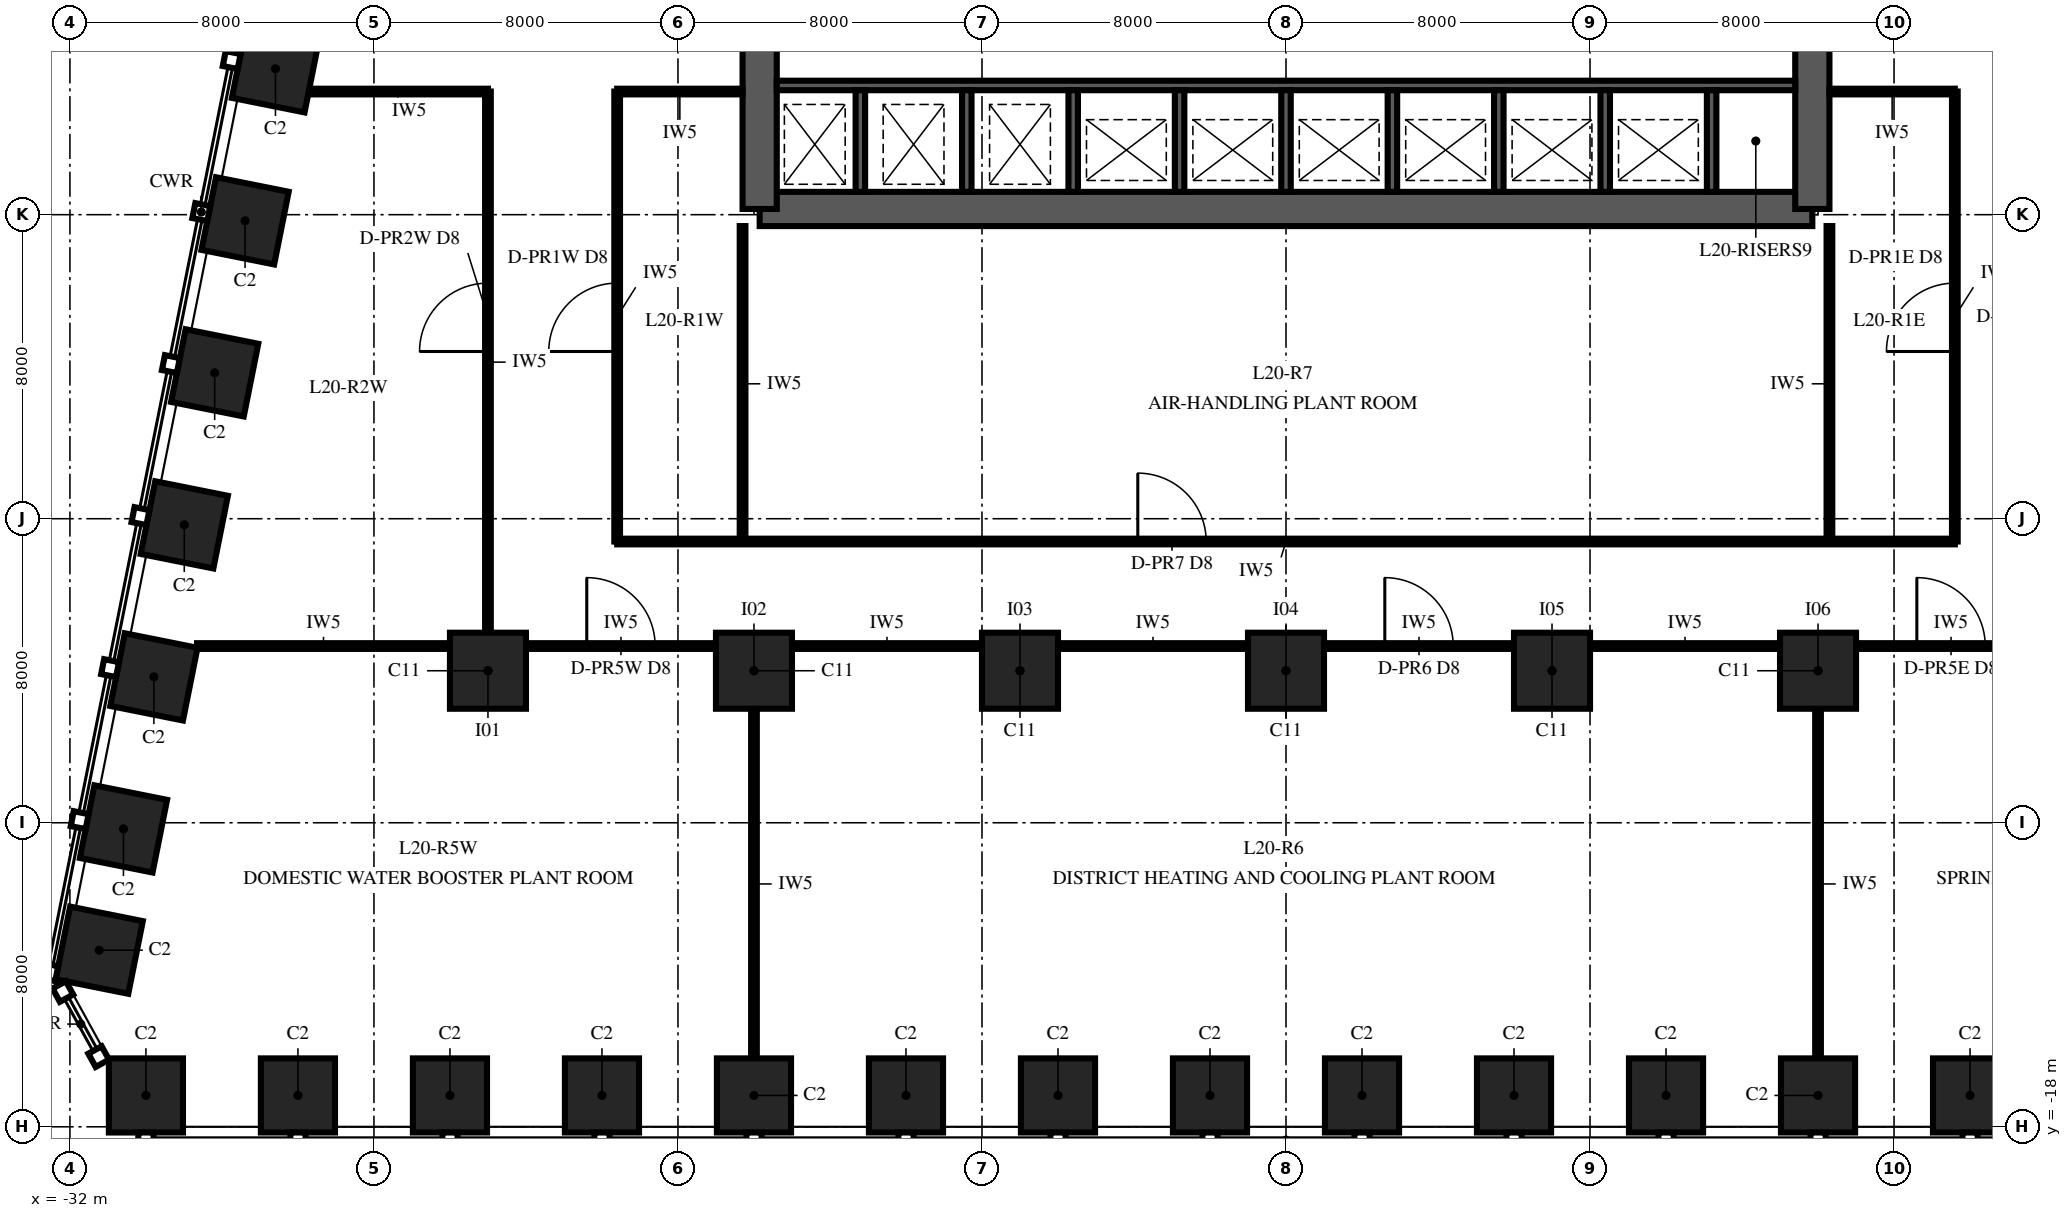
"""IFC4 building model, lengths in metres.
Left out: names, types, materials, properties, quantities, classifications, styles, units other than length and angle.
Written with IfcOpenShell. Run it as: python <this file> out.ifc"""

import sys

from ifc_helpers import new_model, si_unit, direction, frame, frame_2d, origin, origin_2d, place, context, subcontext, project, spatial, polyline, rectangle, outline, extrude, element, fill, save


model = new_model("IFC4")
c1 = context("Model", 3, precision=1e-05, world=origin(), true_north=direction((0.0, 1.0)))
c2 = subcontext(c1, "Body", "Model", "MODEL_VIEW")
j1 = project(units=[si_unit("LENGTHUNIT", "METRE"), si_unit("PLANEANGLEUNIT", "RADIAN")], contexts=[c1])
p1 = place(None, origin())
s1 = spatial("IfcSite", under=j1, at=p1, CompositionType="ELEMENT")
p2 = place(p1, origin())
s2 = spatial("IfcBuilding", under=s1, at=p2, CompositionType="ELEMENT")
p3 = place(p2, frame((0.0, 0.0, 92.0)))
s3 = spatial("IfcBuildingStorey", under=s2, at=p3, CompositionType="ELEMENT", Elevation=92.0)
for number, where, z_axis, x_axis in (
    (1, (-30.0, -17.175, 0.0), (0.0, 0.0, 1.0), (1.0, 0.0, 0.0)),
    (2, (-26.0, -17.175, 0.0), (0.0, 0.0, 1.0), (1.0, 0.0, 0.0)),
    (3, (-22.0, -17.175, 0.0), (0.0, 0.0, 1.0), (1.0, 0.0, 0.0)),
    (4, (-18.0, -17.175, 0.0), (0.0, 0.0, 1.0), (1.0, 0.0, 0.0)),
    (5, (-14.0, -17.175, 0.0), (0.0, 0.0, 1.0), (1.0, 0.0, 0.0)),
    (6, (-10.0, -17.175, 0.0), (0.0, 0.0, 1.0), (1.0, 0.0, 0.0)),
    (7, (-6.0, -17.175, 0.0), (0.0, 0.0, 1.0), (1.0, 0.0, 0.0)),
    (8, (-2.0, -17.175, 0.0), (0.0, 0.0, 1.0), (1.0, 0.0, 0.0)),
    (9, (2.0, -17.175, 0.0), (0.0, 0.0, 1.0), (1.0, 0.0, 0.0)),
    (10, (6.0, -17.175, 0.0), (0.0, 0.0, 1.0), (1.0, 0.0, 0.0)),
    (11, (10.0, -17.175, 0.0), (0.0, 0.0, 1.0), (1.0, 0.0, 0.0)),
    (12, (14.0, -17.175, 0.0), (0.0, 0.0, 1.0), (1.0, 0.0, 0.0)),
    (13, (18.0, -17.175, 0.0), (0.0, 0.0, 1.0), (1.0, 0.0, 0.0)),
    (14, (-26.591, 9.838, 0.0), (0.0, 0.0, 1.0), (-0.196, -0.981, 0.0)),
    (15, (-27.391, 5.838, 0.0), (0.0, 0.0, 1.0), (-0.196, -0.981, 0.0)),
    (16, (-28.191, 1.838, 0.0), (0.0, 0.0, 1.0), (-0.196, -0.981, 0.0)),
    (17, (-28.991, -2.162, 0.0), (0.0, 0.0, 1.0), (-0.196, -0.981, 0.0)),
    (18, (-29.791, -6.162, 0.0), (0.0, 0.0, 1.0), (-0.196, -0.981, 0.0)),
    (19, (-30.591, -10.162, 0.0), (0.0, 0.0, 1.0), (-0.196, -0.981, 0.0)),
    (20, (-31.229, -13.353, 0.0), (0.0, 0.0, 1.0), (-0.196, -0.981, 0.0)),
):
    element("IfcColumn", number, at=place(p3, frame(where, z_axis=z_axis, x_axis=x_axis)), inside=s3, PredefinedType="COLUMN", context=c2, shape_type="SweptSolid", body=[
        extrude(rectangle(XDim=1.95, YDim=1.95, at=origin_2d()), origin(), (0.0, 0.0, 1.0), 6.0),
    ])
for number, where, z_axis, x_axis in (
    (21, (-21.0, -6.0, 0.0), (0.0, 0.0, 1.0), (1.0, 0.0, 0.0)),
    (22, (-14.0, -6.0, 0.0), (0.0, 0.0, 1.0), (1.0, 0.0, 0.0)),
    (23, (-7.0, -6.0, 0.0), (0.0, 0.0, 1.0), (1.0, 0.0, 0.0)),
    (24, (0.0, -6.0, 0.0), (0.0, 0.0, 1.0), (1.0, 0.0, 0.0)),
    (25, (7.0, -6.0, 0.0), (0.0, 0.0, 1.0), (1.0, 0.0, 0.0)),
    (26, (14.0, -6.0, 0.0), (0.0, 0.0, 1.0), (1.0, 0.0, 0.0)),
):
    element("IfcColumn", number, at=place(p3, frame(where, z_axis=z_axis, x_axis=x_axis)), inside=s3, PredefinedType="COLUMN", context=c2, shape_type="SweptSolid", body=[
        extrude(rectangle(XDim=2.0, YDim=2.0, at=origin_2d()), origin(), (0.0, 0.0, 1.0), 6.0),
    ])
p4 = place(p3, frame((-13.85, 6.15, 0.0), z_axis=(0.0, 0.0, 1.0), x_axis=(1.0, 0.0, 0.0)))
e27 = element("IfcWall", 27, at=p4, inside=s3, PredefinedType="SHEAR", context=c2, shape_type="SweptSolid", body=[
    extrude(rectangle(XDim=27.7, YDim=0.9, at=frame_2d((13.85, 0.0))), origin(), (0.0, 0.0, 1.0), 6.0),
])
for number, where, z_axis, x_axis in (
    (28, (13.85, 6.15, 0.0), (0.0, 0.0, 1.0), (0.0, 1.0, 0.0)),
    (29, (-13.85, 23.85, 0.0), (0.0, 0.0, 1.0), (0.0, -1.0, 0.0)),
):
    element("IfcWall", number, at=place(p3, frame(where, z_axis=z_axis, x_axis=x_axis)), inside=s3, PredefinedType="SHEAR", context=c2, shape_type="SweptSolid", body=[
        extrude(outline(polyline([(0.0, -0.45), (17.7, -0.45), (17.7, 0.0), (17.25, 0.0), (17.25, 0.45), (0.45, 0.45), (0.45, 0.0), (0.0, 0.0), (0.0, -0.45)])), origin(), (0.0, 0.0, 1.0), 6.0),
    ])
p5 = place(p3, frame((-13.4, 9.4, 0.0), z_axis=(0.0, 0.0, 1.0), x_axis=(1.0, 0.0, 0.0)))
e30 = element("IfcWall", 30, at=p5, inside=s3, PredefinedType="SHEAR", context=c2, shape_type="SweptSolid", body=[
    extrude(rectangle(XDim=26.8, YDim=0.25, at=frame_2d((13.4, 0.0))), origin(), (0.0, 0.0, 1.0), 6.0),
])
for number, where, z_axis, x_axis in (
    (31, (-11.2, 6.6, 0.0), (0.0, 0.0, 1.0), (0.0, 1.0, 0.0)),
    (32, (-8.4, 6.6, 0.0), (0.0, 0.0, 1.0), (0.0, 1.0, 0.0)),
    (33, (-5.6, 6.6, 0.0), (0.0, 0.0, 1.0), (0.0, 1.0, 0.0)),
    (34, (-2.8, 6.6, 0.0), (0.0, 0.0, 1.0), (0.0, 1.0, 0.0)),
    (35, (0.0, 6.6, 0.0), (0.0, 0.0, 1.0), (0.0, 1.0, 0.0)),
    (36, (2.8, 6.6, 0.0), (0.0, 0.0, 1.0), (0.0, 1.0, 0.0)),
    (37, (5.6, 6.6, 0.0), (0.0, 0.0, 1.0), (0.0, 1.0, 0.0)),
    (38, (8.4, 6.6, 0.0), (0.0, 0.0, 1.0), (0.0, 1.0, 0.0)),
    (39, (11.2, 6.6, 0.0), (0.0, 0.0, 1.0), (0.0, 1.0, 0.0)),
):
    element("IfcWall", number, at=place(p3, frame(where, z_axis=z_axis, x_axis=x_axis)), inside=s3, PredefinedType="SHEAR", context=c2, shape_type="SweptSolid", body=[
        extrude(rectangle(XDim=2.675, YDim=0.25, at=frame_2d((1.337, 0.0))), origin(), (0.0, 0.0, 1.0), 6.0),
    ])
p6 = place(p3, frame((17.6, -2.6, 0.0), z_axis=(0.0, 0.0, 1.0), x_axis=(0.0, 1.0, 0.0)))
e40 = element("IfcWall", 40, at=p6, inside=s3, PredefinedType="PARTITIONING", context=c2, shape_type="SweptSolid", body=[
    extrude(rectangle(XDim=11.84, YDim=0.15, at=frame_2d((5.92, 0.0))), origin(), (0.0, 0.0, 1.0), 5.8),
])
p7 = place(p6, frame((5.0, 0.0, 0.0)))
e41 = element("IfcOpeningElement", 41, at=p7, cuts=e40, PredefinedType="OPENING", context=c2, shape_type="SweptSolid", body=[
    extrude(rectangle(XDim=1.8, YDim=2.4, at=frame_2d((0.9, 1.2))), frame((0.0, 0.09, 0.0), z_axis=(0.0, -1.0, 0.0), x_axis=(1.0, 0.0, 0.0)), (0.0, 0.0, 1.0), 0.18),
])
p8 = place(p3, frame((14.3, -2.6, 0.0), z_axis=(0.0, 0.0, 1.0), x_axis=(0.0, 1.0, 0.0)))
e42 = element("IfcWall", 42, at=p8, inside=s3, PredefinedType="PARTITIONING", context=c2, shape_type="SweptSolid", body=[
    extrude(rectangle(XDim=8.3, YDim=0.15, at=frame_2d((4.15, 0.0))), origin(), (0.0, 0.0, 1.0), 5.8),
])
p9 = place(p3, frame((14.3, 9.24, 0.0), z_axis=(0.0, 0.0, 1.0), x_axis=(1.0, 0.0, 0.0)))
e43 = element("IfcWall", 43, at=p9, inside=s3, PredefinedType="PARTITIONING", context=c2, shape_type="SweptSolid", body=[
    extrude(rectangle(XDim=3.3, YDim=0.15, at=frame_2d((1.65, 0.0))), origin(), (0.0, 0.0, 1.0), 5.179),
])
p10 = place(p3, frame((14.0, -7.0, 0.0), z_axis=(0.0, 0.0, 1.0), x_axis=(0.0, -1.0, 0.0)))
e44 = element("IfcWall", 44, at=p10, inside=s3, PredefinedType="PARTITIONING", context=c2, shape_type="SweptSolid", body=[
    extrude(rectangle(XDim=9.22, YDim=0.15, at=frame_2d((4.61, 0.0))), origin(), (0.0, 0.0, 1.0), 5.179),
])
p11 = place(p3, frame((-17.6, -2.6, 0.0), z_axis=(0.0, 0.0, 1.0), x_axis=(0.0, 1.0, 0.0)))
e45 = element("IfcWall", 45, at=p11, inside=s3, PredefinedType="PARTITIONING", context=c2, shape_type="SweptSolid", body=[
    extrude(rectangle(XDim=11.84, YDim=0.15, at=frame_2d((5.92, 0.0))), origin(), (0.0, 0.0, 1.0), 5.8),
])
p12 = place(p11, frame((5.0, 0.0, 0.0)))
e46 = element("IfcOpeningElement", 46, at=p12, cuts=e45, PredefinedType="OPENING", context=c2, shape_type="SweptSolid", body=[
    extrude(rectangle(XDim=1.8, YDim=2.4, at=frame_2d((0.9, 1.2))), frame((0.0, 0.09, 0.0), z_axis=(0.0, -1.0, 0.0), x_axis=(1.0, 0.0, 0.0)), (0.0, 0.0, 1.0), 0.18),
])
p13 = place(p3, frame((-21.0, -5.0, 0.0), z_axis=(0.0, 0.0, 1.0), x_axis=(0.0, 1.0, 0.0)))
e47 = element("IfcWall", 47, at=p13, inside=s3, PredefinedType="PARTITIONING", context=c2, shape_type="SweptSolid", body=[
    extrude(rectangle(XDim=14.24, YDim=0.15, at=frame_2d((7.12, 0.0))), origin(), (0.0, 0.0, 1.0), 5.8),
])
p14 = place(p13, frame((7.4, 0.0, 0.0)))
e48 = element("IfcOpeningElement", 48, at=p14, cuts=e47, PredefinedType="OPENING", context=c2, shape_type="SweptSolid", body=[
    extrude(rectangle(XDim=1.8, YDim=2.4, at=frame_2d((0.9, 1.2))), frame((0.0, 0.09, 0.0), z_axis=(0.0, -1.0, 0.0), x_axis=(1.0, 0.0, 0.0)), (0.0, 0.0, 1.0), 0.18),
])
p15 = place(p3, frame((-14.3, -2.6, 0.0), z_axis=(0.0, 0.0, 1.0), x_axis=(0.0, 1.0, 0.0)))
e49 = element("IfcWall", 49, at=p15, inside=s3, PredefinedType="PARTITIONING", context=c2, shape_type="SweptSolid", body=[
    extrude(rectangle(XDim=8.3, YDim=0.15, at=frame_2d((4.15, 0.0))), origin(), (0.0, 0.0, 1.0), 5.8),
])
p16 = place(p3, frame((-14.3, 9.24, 0.0), z_axis=(0.0, 0.0, 1.0), x_axis=(-1.0, 0.0, 0.0)))
e50 = element("IfcWall", 50, at=p16, inside=s3, PredefinedType="PARTITIONING", context=c2, shape_type="SweptSolid", body=[
    extrude(rectangle(XDim=3.3, YDim=0.15, at=frame_2d((1.65, 0.0))), origin(), (0.0, 0.0, 1.0), 5.179),
])
p17 = place(p3, frame((-21.0, 9.24, 0.0), z_axis=(0.0, 0.0, 1.0), x_axis=(-1.0, 0.0, 0.0)))
e51 = element("IfcWall", 51, at=p17, inside=s3, PredefinedType="PARTITIONING", context=c2, shape_type="SweptSolid", body=[
    extrude(rectangle(XDim=4.737, YDim=0.15, at=frame_2d((2.368, 0.0))), origin(), (0.0, 0.0, 1.0), 5.8),
])
p18 = place(p3, frame((-14.0, -7.0, 0.0), z_axis=(0.0, 0.0, 1.0), x_axis=(0.0, -1.0, 0.0)))
e52 = element("IfcWall", 52, at=p18, inside=s3, PredefinedType="PARTITIONING", context=c2, shape_type="SweptSolid", body=[
    extrude(rectangle(XDim=9.22, YDim=0.15, at=frame_2d((4.61, 0.0))), origin(), (0.0, 0.0, 1.0), 5.179),
])
p19 = place(p3, frame((-28.655, -5.35, 0.0), z_axis=(0.0, 0.0, 1.0), x_axis=(1.0, 0.0, 0.0)))
e53 = element("IfcWall", 53, at=p19, inside=s3, PredefinedType="PARTITIONING", context=c2, shape_type="SweptSolid", body=[
    extrude(rectangle(XDim=6.655, YDim=0.15, at=frame_2d((3.327, 0.0))), origin(), (0.0, 0.0, 1.0), 5.8),
])
p20 = place(p3, frame((-20.0, -5.35, 0.0), z_axis=(0.0, 0.0, 1.0), x_axis=(1.0, 0.0, 0.0)))
e54 = element("IfcWall", 54, at=p20, inside=s3, PredefinedType="PARTITIONING", context=c2, shape_type="SweptSolid", body=[
    extrude(rectangle(XDim=5.0, YDim=0.15, at=frame_2d((2.5, 0.0))), origin(), (0.0, 0.0, 1.0), 5.8),
])
p21 = place(p20, frame((1.6, 0.0, 0.0)))
e55 = element("IfcOpeningElement", 55, at=p21, cuts=e54, PredefinedType="OPENING", context=c2, shape_type="SweptSolid", body=[
    extrude(rectangle(XDim=1.8, YDim=2.4, at=frame_2d((0.9, 1.2))), frame((0.0, 0.09, 0.0), z_axis=(0.0, -1.0, 0.0), x_axis=(1.0, 0.0, 0.0)), (0.0, 0.0, 1.0), 0.18),
])
for number, where, z_axis, x_axis in (
    (56, (-13.0, -5.35, 0.0), (0.0, 0.0, 1.0), (1.0, 0.0, 0.0)),
    (57, (-6.0, -5.35, 0.0), (0.0, 0.0, 1.0), (1.0, 0.0, 0.0)),
):
    element("IfcWall", number, at=place(p3, frame(where, z_axis=z_axis, x_axis=x_axis)), inside=s3, PredefinedType="PARTITIONING", context=c2, shape_type="SweptSolid", body=[
        extrude(rectangle(XDim=5.0, YDim=0.15, at=frame_2d((2.5, 0.0))), origin(), (0.0, 0.0, 1.0), 5.8),
    ])
p22 = place(p3, frame((1.0, -5.35, 0.0), z_axis=(0.0, 0.0, 1.0), x_axis=(1.0, 0.0, 0.0)))
e58 = element("IfcWall", 58, at=p22, inside=s3, PredefinedType="PARTITIONING", context=c2, shape_type="SweptSolid", body=[
    extrude(rectangle(XDim=5.0, YDim=0.15, at=frame_2d((2.5, 0.0))), origin(), (0.0, 0.0, 1.0), 5.8),
])
p23 = place(p22, frame((1.6, 0.0, 0.0)))
e59 = element("IfcOpeningElement", 59, at=p23, cuts=e58, PredefinedType="OPENING", context=c2, shape_type="SweptSolid", body=[
    extrude(rectangle(XDim=1.8, YDim=2.4, at=frame_2d((0.9, 1.2))), frame((0.0, 0.09, 0.0), z_axis=(0.0, -1.0, 0.0), x_axis=(1.0, 0.0, 0.0)), (0.0, 0.0, 1.0), 0.18),
])
p24 = place(p3, frame((8.0, -5.35, 0.0), z_axis=(0.0, 0.0, 1.0), x_axis=(1.0, 0.0, 0.0)))
e60 = element("IfcWall", 60, at=p24, inside=s3, PredefinedType="PARTITIONING", context=c2, shape_type="SweptSolid", body=[
    extrude(rectangle(XDim=5.0, YDim=0.15, at=frame_2d((2.5, 0.0))), origin(), (0.0, 0.0, 1.0), 5.8),
])
p25 = place(p3, frame((15.0, -5.35, 0.0), z_axis=(0.0, 0.0, 1.0), x_axis=(1.0, 0.0, 0.0)))
e61 = element("IfcWall", 61, at=p25, inside=s3, PredefinedType="PARTITIONING", context=c2, shape_type="SweptSolid", body=[
    extrude(rectangle(XDim=5.0, YDim=0.15, at=frame_2d((2.5, 0.0))), origin(), (0.0, 0.0, 1.0), 5.8),
])
p26 = place(p25, frame((1.6, 0.0, 0.0)))
e62 = element("IfcOpeningElement", 62, at=p26, cuts=e61, PredefinedType="OPENING", context=c2, shape_type="SweptSolid", body=[
    extrude(rectangle(XDim=1.8, YDim=2.4, at=frame_2d((0.9, 1.2))), frame((0.0, 0.09, 0.0), z_axis=(0.0, -1.0, 0.0), x_axis=(1.0, 0.0, 0.0)), (0.0, 0.0, 1.0), 0.18),
])
p27 = place(p3, frame((-17.6, -2.6, 0.0), z_axis=(0.0, 0.0, 1.0), x_axis=(1.0, 0.0, 0.0)))
e63 = element("IfcWall", 63, at=p27, inside=s3, PredefinedType="PARTITIONING", context=c2, shape_type="SweptSolid", body=[
    extrude(rectangle(XDim=35.2, YDim=0.15, at=frame_2d((17.6, 0.0))), origin(), (0.0, 0.0, 1.0), 5.8),
])
p28 = place(p27, frame((13.7, 0.0, 0.0)))
e64 = element("IfcOpeningElement", 64, at=p28, cuts=e63, PredefinedType="OPENING", context=c2, shape_type="SweptSolid", body=[
    extrude(rectangle(XDim=1.8, YDim=2.4, at=frame_2d((0.9, 1.2))), frame((0.0, 0.09, 0.0), z_axis=(0.0, -1.0, 0.0), x_axis=(1.0, 0.0, 0.0)), (0.0, 0.0, 1.0), 0.18),
])
p29 = place(p7, origin())
e65 = element("IfcDoor", 65, at=p29, inside=s3, OperationType="DOUBLE_DOOR_SINGLE_SWING", PredefinedType="DOOR", context=c2, shape_type="SweptSolid", body=[
    extrude(rectangle(XDim=1.8, YDim=2.4, at=frame_2d((0.9, 1.2))), frame((0.0, 0.075, 0.0), z_axis=(0.0, -1.0, 0.0), x_axis=(1.0, 0.0, 0.0)), (0.0, 0.0, 1.0), 0.149),
])
fill(e41, e65)
p30 = place(p12, origin())
e66 = element("IfcDoor", 66, at=p30, inside=s3, OperationType="DOUBLE_DOOR_SINGLE_SWING", PredefinedType="DOOR", context=c2, shape_type="SweptSolid", body=[
    extrude(rectangle(XDim=1.8, YDim=2.4, at=frame_2d((0.9, 1.2))), frame((0.0, 0.075, 0.0), z_axis=(0.0, -1.0, 0.0), x_axis=(1.0, 0.0, 0.0)), (0.0, 0.0, 1.0), 0.149),
])
fill(e46, e66)
p31 = place(p14, origin())
e67 = element("IfcDoor", 67, at=p31, inside=s3, OperationType="DOUBLE_DOOR_SINGLE_SWING", PredefinedType="DOOR", context=c2, shape_type="SweptSolid", body=[
    extrude(rectangle(XDim=1.8, YDim=2.4, at=frame_2d((0.9, 1.2))), frame((0.0, 0.075, 0.0), z_axis=(0.0, -1.0, 0.0), x_axis=(1.0, 0.0, 0.0)), (0.0, 0.0, 1.0), 0.149),
])
fill(e48, e67)
p32 = place(p26, origin())
e68 = element("IfcDoor", 68, at=p32, inside=s3, OperationType="DOUBLE_DOOR_SINGLE_SWING", PredefinedType="DOOR", context=c2, shape_type="SweptSolid", body=[
    extrude(rectangle(XDim=1.8, YDim=2.4, at=frame_2d((0.9, 1.2))), frame((0.0, 0.075, 0.0), z_axis=(0.0, -1.0, 0.0), x_axis=(1.0, 0.0, 0.0)), (0.0, 0.0, 1.0), 0.149),
])
fill(e62, e68)
p33 = place(p21, origin())
e69 = element("IfcDoor", 69, at=p33, inside=s3, OperationType="DOUBLE_DOOR_SINGLE_SWING", PredefinedType="DOOR", context=c2, shape_type="SweptSolid", body=[
    extrude(rectangle(XDim=1.8, YDim=2.4, at=frame_2d((0.9, 1.2))), frame((0.0, 0.075, 0.0), z_axis=(0.0, -1.0, 0.0), x_axis=(1.0, 0.0, 0.0)), (0.0, 0.0, 1.0), 0.149),
])
fill(e55, e69)
p34 = place(p23, origin())
e70 = element("IfcDoor", 70, at=p34, inside=s3, OperationType="DOUBLE_DOOR_SINGLE_SWING", PredefinedType="DOOR", context=c2, shape_type="SweptSolid", body=[
    extrude(rectangle(XDim=1.8, YDim=2.4, at=frame_2d((0.9, 1.2))), frame((0.0, 0.075, 0.0), z_axis=(0.0, -1.0, 0.0), x_axis=(1.0, 0.0, 0.0)), (0.0, 0.0, 1.0), 0.149),
])
fill(e59, e70)
p35 = place(p28, origin())
e71 = element("IfcDoor", 71, at=p35, inside=s3, OperationType="DOUBLE_DOOR_SINGLE_SWING", PredefinedType="DOOR", context=c2, shape_type="SweptSolid", body=[
    extrude(rectangle(XDim=1.8, YDim=2.4, at=frame_2d((0.9, 1.2))), frame((0.0, 0.075, 0.0), z_axis=(0.0, -1.0, 0.0), x_axis=(1.0, 0.0, 0.0)), (0.0, 0.0, 1.0), 0.149),
])
fill(e64, e71)
save(model, sys.argv[1])
